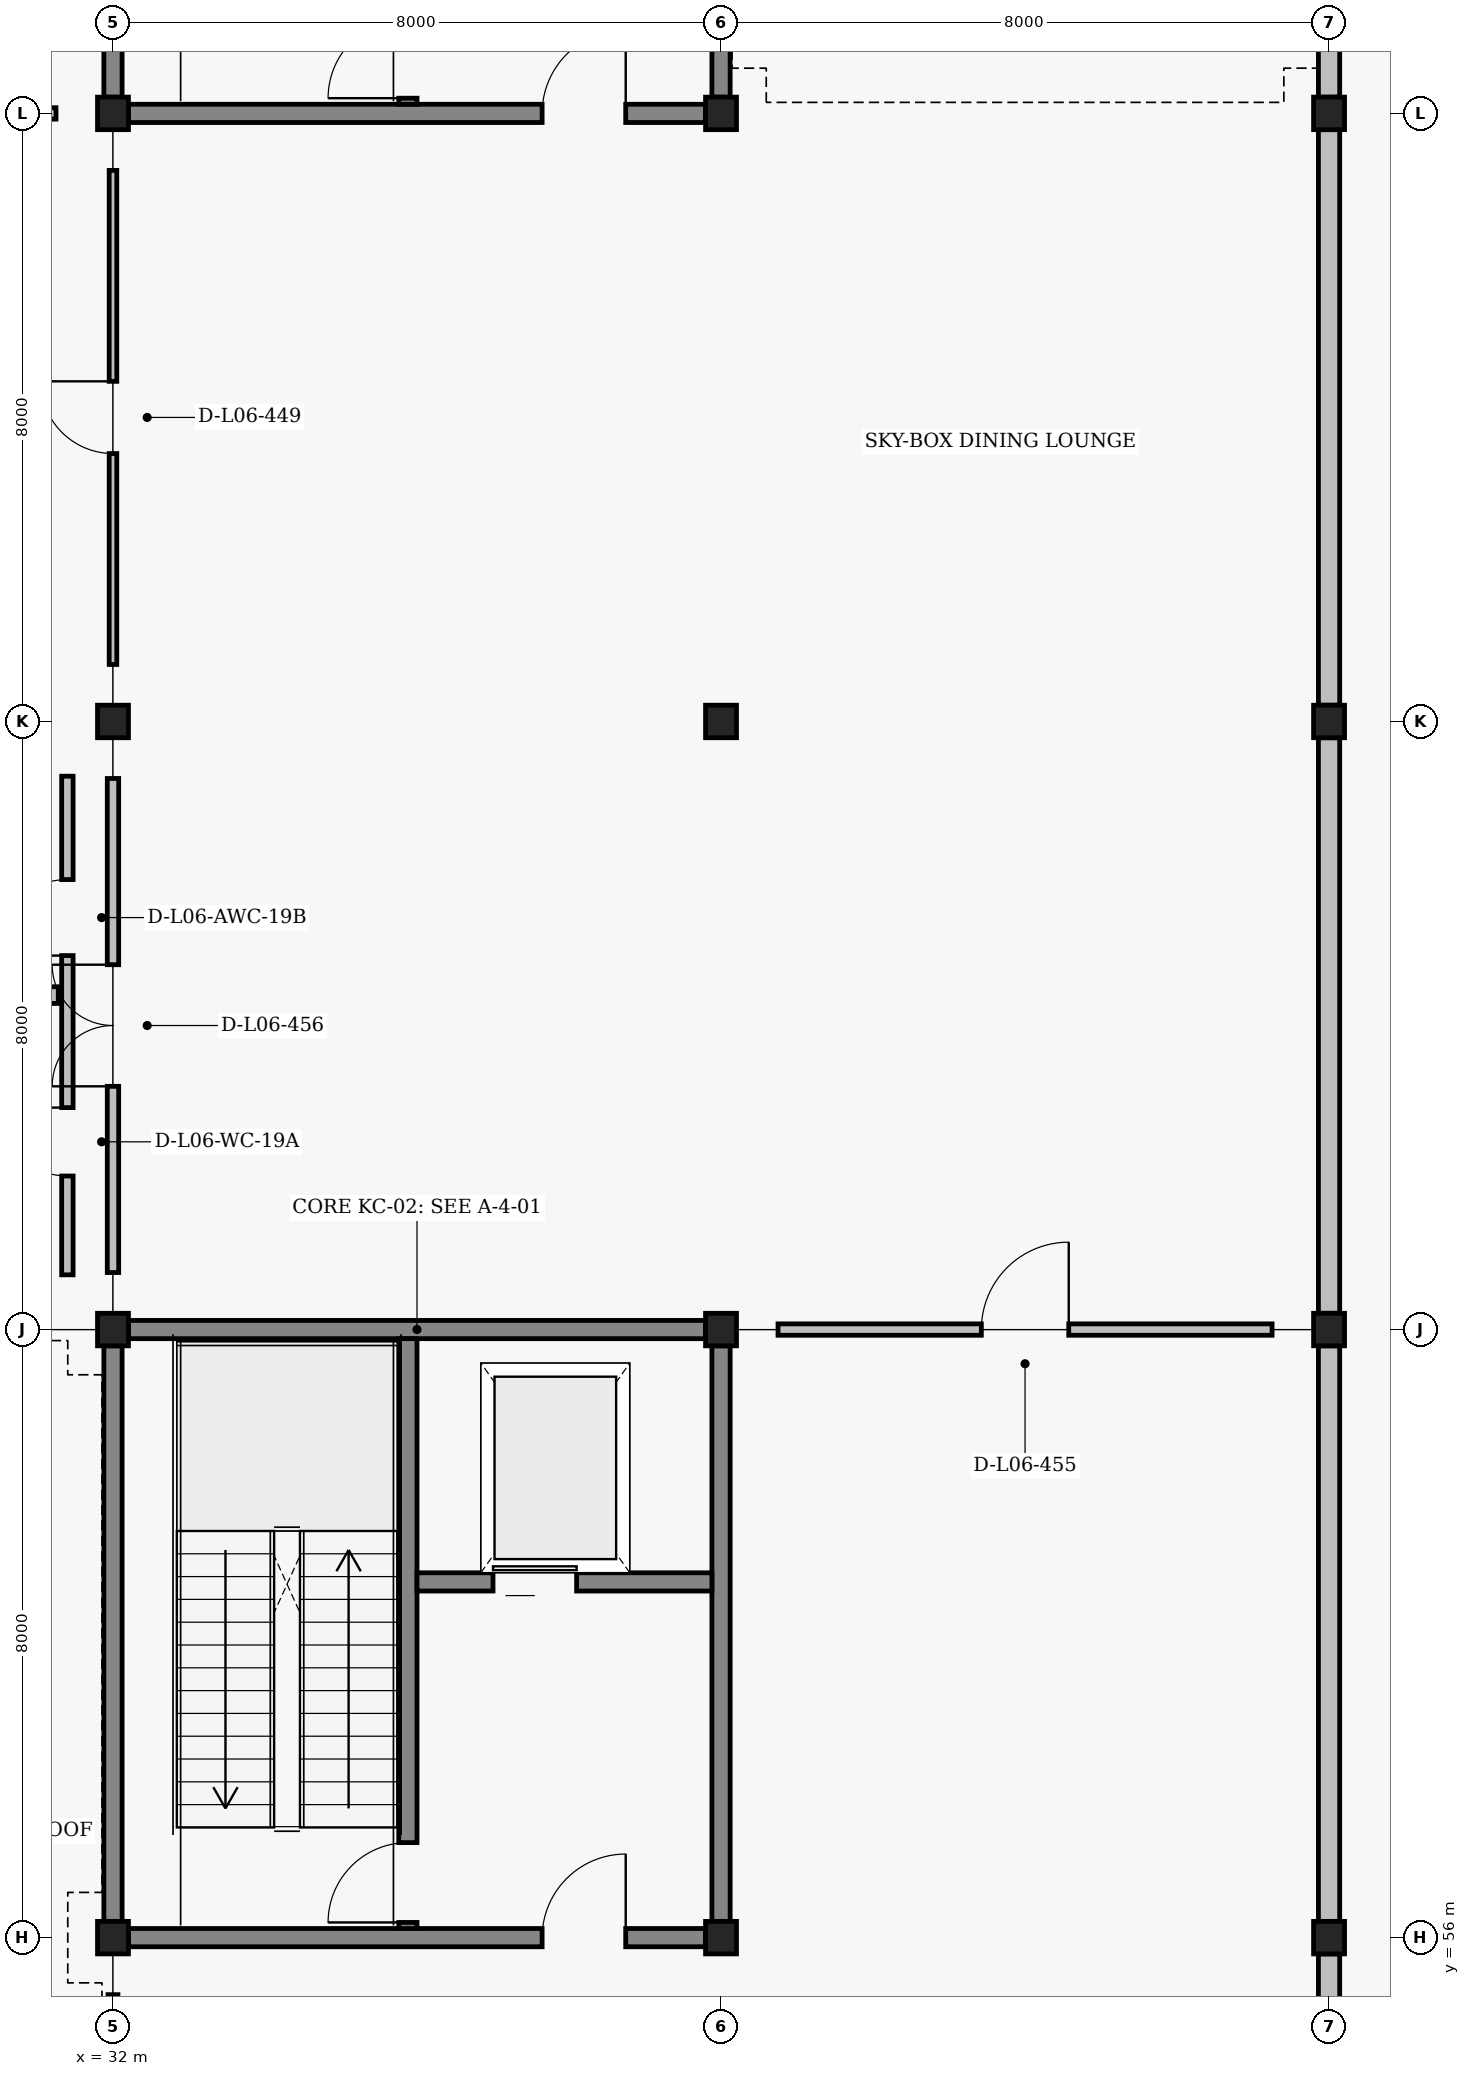
"""IFC4 building model, lengths in metres.
Left out: names, types, materials, properties, quantities, classifications, styles, units other than length and angle.
Written with IfcOpenShell. Run it as: python <this file> out.ifc"""

import sys

from ifc_helpers import new_model, si_unit, direction, frame, frame_2d, origin, origin_2d, place, context, subcontext, project, spatial, rectangle, i_section, extrude, element, fill, save


model = new_model("IFC4")
c1 = context("Model", 3, precision=1e-05, world=origin(), true_north=direction((0.0, 1.0)))
c2 = subcontext(c1, "Body", "Model", "MODEL_VIEW")
j1 = project(units=[si_unit("LENGTHUNIT", "METRE"), si_unit("PLANEANGLEUNIT", "RADIAN")], contexts=[c1])
p1 = place(None, origin())
s1 = spatial("IfcSite", under=j1, at=p1, CompositionType="ELEMENT")
p2 = place(p1, origin())
s2 = spatial("IfcBuilding", under=s1, at=p2, CompositionType="ELEMENT")
p3 = place(p2, frame((0.0, 0.0, 22.8)))
s3 = spatial("IfcBuildingStorey", under=s2, at=p3, CompositionType="ELEMENT", Elevation=22.8)
for number, where, z_axis, x_axis in (
    (1, (32.0, 56.0, 0.0), (0.0, 0.0, 1.0), (1.0, 0.0, 0.0)),
    (2, (32.0, 64.0, 0.0), (0.0, 0.0, 1.0), (1.0, 0.0, 0.0)),
    (3, (32.0, 72.0, 0.0), (0.0, 0.0, 1.0), (1.0, 0.0, 0.0)),
    (4, (32.0, 80.0, 0.0), (0.0, 0.0, 1.0), (1.0, 0.0, 0.0)),
    (5, (40.0, 56.0, 0.0), (0.0, 0.0, 1.0), (1.0, 0.0, 0.0)),
    (6, (40.0, 64.0, 0.0), (0.0, 0.0, 1.0), (1.0, 0.0, 0.0)),
    (7, (40.0, 72.0, 0.0), (0.0, 0.0, 1.0), (1.0, 0.0, 0.0)),
    (8, (40.0, 80.0, 0.0), (0.0, 0.0, 1.0), (1.0, 0.0, 0.0)),
    (9, (48.0, 56.0, 0.0), (0.0, 0.0, 1.0), (1.0, 0.0, 0.0)),
    (10, (48.0, 64.0, 0.0), (0.0, 0.0, 1.0), (1.0, 0.0, 0.0)),
    (11, (48.0, 72.0, 0.0), (0.0, 0.0, 1.0), (1.0, 0.0, 0.0)),
    (12, (48.0, 80.0, 0.0), (0.0, 0.0, 1.0), (1.0, 0.0, 0.0)),
):
    element("IfcColumn", number, at=place(p3, frame(where, z_axis=z_axis, x_axis=x_axis)), inside=s3, PredefinedType="COLUMN", context=c2, shape_type="SweptSolid", body=[
        extrude(i_section(OverallWidth=0.407, OverallDepth=0.428, WebThickness=0.02, FlangeThickness=0.035, at=origin_2d()), origin(), (0.0, 0.0, 1.0), 4.2),
    ])
for number, where, z_axis, x_axis in (
    (13, (48.0, 48.214, 0.0), (0.0, 0.0, 1.0), (0.0, 1.0, 0.0)),
    (14, (48.0, 56.214, 0.0), (0.0, 0.0, 1.0), (0.0, 1.0, 0.0)),
    (15, (48.0, 64.214, 0.0), (0.0, 0.0, 1.0), (0.0, 1.0, 0.0)),
    (16, (48.0, 72.214, 0.0), (0.0, 0.0, 1.0), (0.0, 1.0, 0.0)),
    (17, (48.0, 80.214, 0.0), (0.0, 0.0, 1.0), (0.0, 1.0, 0.0)),
):
    element("IfcWall", number, at=place(p3, frame(where, z_axis=z_axis, x_axis=x_axis)), inside=s3, PredefinedType="SOLIDWALL", context=c2, shape_type="SweptSolid", body=[
        extrude(rectangle(XDim=7.572, YDim=0.28, at=frame_2d((3.786, 0.0))), origin(), (0.0, 0.0, 1.0), 3.34),
    ])
p4 = place(p3, frame((32.204, 56.0, 0.0), z_axis=(0.0, 0.0, 1.0), x_axis=(1.0, 0.0, 0.0)))
e18 = element("IfcWall", 18, at=p4, inside=s3, PredefinedType="SHEAR", context=c2, shape_type="SweptSolid", body=[
    extrude(rectangle(XDim=7.592, YDim=0.24, at=frame_2d((3.796, 0.0))), origin(), (0.0, 0.0, 1.0), 3.34),
])
p5 = place(p4, frame((5.442, 0.0, 0.0)))
e19 = element("IfcOpeningElement", 19, at=p5, cuts=e18, PredefinedType="OPENING", context=c2, shape_type="SweptSolid", body=[
    extrude(rectangle(XDim=1.1, YDim=2.2, at=frame_2d((0.55, 1.1))), frame((0.0, 0.13, 0.0), z_axis=(0.0, -1.0, 0.0), x_axis=(1.0, 0.0, 0.0)), (0.0, 0.0, 1.0), 0.26),
])
p6 = place(p3, frame((32.204, 64.0, 0.0), z_axis=(0.0, 0.0, 1.0), x_axis=(1.0, 0.0, 0.0)))
e20 = element("IfcWall", 20, at=p6, inside=s3, PredefinedType="SHEAR", context=c2, shape_type="SweptSolid", body=[
    extrude(rectangle(XDim=7.592, YDim=0.24, at=frame_2d((3.796, 0.0))), origin(), (0.0, 0.0, 1.0), 3.34),
])
for number, where, z_axis, x_axis in (
    (21, (32.0, 56.214, 0.0), (0.0, 0.0, 1.0), (0.0, 1.0, 0.0)),
    (22, (40.0, 56.214, 0.0), (0.0, 0.0, 1.0), (0.0, 1.0, 0.0)),
):
    element("IfcWall", number, at=place(p3, frame(where, z_axis=z_axis, x_axis=x_axis)), inside=s3, PredefinedType="SHEAR", context=c2, shape_type="SweptSolid", body=[
        extrude(rectangle(XDim=7.572, YDim=0.24, at=frame_2d((3.786, 0.0))), origin(), (0.0, 0.0, 1.0), 3.34),
    ])
p7 = place(p3, frame((35.88, 56.12, 0.0), z_axis=(0.0, 0.0, 1.0), x_axis=(0.0, 1.0, 0.0)))
e23 = element("IfcWall", 23, at=p7, inside=s3, PredefinedType="SHEAR", context=c2, shape_type="SweptSolid", body=[
    extrude(rectangle(XDim=7.76, YDim=0.24, at=frame_2d((3.88, 0.0))), origin(), (0.0, 0.0, 1.0), 3.44),
])
p8 = place(p7, frame((0.08, 0.0, 0.0)))
e24 = element("IfcOpeningElement", 24, at=p8, cuts=e23, PredefinedType="OPENING", context=c2, shape_type="SweptSolid", body=[
    extrude(rectangle(XDim=1.05, YDim=2.15, at=frame_2d((0.525, 1.075))), frame((0.0, 0.13, 0.0), z_axis=(0.0, -1.0, 0.0), x_axis=(1.0, 0.0, 0.0)), (0.0, 0.0, 1.0), 0.26),
])
p9 = place(p3, frame((36.0, 60.68, 0.0), z_axis=(0.0, 0.0, 1.0), x_axis=(1.0, 0.0, 0.0)))
e25 = element("IfcWall", 25, at=p9, inside=s3, PredefinedType="SHEAR", context=c2, shape_type="SweptSolid", body=[
    extrude(rectangle(XDim=3.88, YDim=0.24, at=frame_2d((1.94, 0.0))), origin(), (0.0, 0.0, 1.0), 3.34),
])
p10 = place(p9, frame((1.0, 0.0, 0.0)))
e26 = element("IfcOpeningElement", 26, at=p10, cuts=e25, PredefinedType="OPENING", context=c2, shape_type="SweptSolid", body=[
    extrude(rectangle(XDim=1.1, YDim=2.15, at=frame_2d((0.55, 1.075))), frame((0.0, 0.13, 0.0), z_axis=(0.0, -1.0, 0.0), x_axis=(1.0, 0.0, 0.0)), (0.0, 0.0, 1.0), 0.26),
])
p11 = place(p3, frame((32.204, 80.0, 0.0), z_axis=(0.0, 0.0, 1.0), x_axis=(1.0, 0.0, 0.0)))
e27 = element("IfcWall", 27, at=p11, inside=s3, PredefinedType="SHEAR", context=c2, shape_type="SweptSolid", body=[
    extrude(rectangle(XDim=7.592, YDim=0.24, at=frame_2d((3.796, 0.0))), origin(), (0.0, 0.0, 1.0), 3.34),
])
p12 = place(p11, frame((5.442, 0.0, 0.0)))
e28 = element("IfcOpeningElement", 28, at=p12, cuts=e27, PredefinedType="OPENING", context=c2, shape_type="SweptSolid", body=[
    extrude(rectangle(XDim=1.1, YDim=2.2, at=frame_2d((0.55, 1.1))), frame((0.0, 0.13, 0.0), z_axis=(0.0, -1.0, 0.0), x_axis=(1.0, 0.0, 0.0)), (0.0, 0.0, 1.0), 0.26),
])
for number, where, z_axis, x_axis in (
    (29, (32.0, 80.214, 0.0), (0.0, 0.0, 1.0), (0.0, 1.0, 0.0)),
    (30, (40.0, 80.214, 0.0), (0.0, 0.0, 1.0), (0.0, 1.0, 0.0)),
):
    element("IfcWall", number, at=place(p3, frame(where, z_axis=z_axis, x_axis=x_axis)), inside=s3, PredefinedType="SHEAR", context=c2, shape_type="SweptSolid", body=[
        extrude(rectangle(XDim=7.572, YDim=0.24, at=frame_2d((3.786, 0.0))), origin(), (0.0, 0.0, 1.0), 3.34),
    ])
p13 = place(p3, frame((35.88, 80.12, 0.0), z_axis=(0.0, 0.0, 1.0), x_axis=(0.0, 1.0, 0.0)))
e31 = element("IfcWall", 31, at=p13, inside=s3, PredefinedType="SHEAR", context=c2, shape_type="SweptSolid", body=[
    extrude(rectangle(XDim=7.76, YDim=0.24, at=frame_2d((3.88, 0.0))), origin(), (0.0, 0.0, 1.0), 3.44),
])
p14 = place(p13, frame((0.08, 0.0, 0.0)))
e32 = element("IfcOpeningElement", 32, at=p14, cuts=e31, PredefinedType="OPENING", context=c2, shape_type="SweptSolid", body=[
    extrude(rectangle(XDim=1.05, YDim=2.15, at=frame_2d((0.525, 1.075))), frame((0.0, 0.13, 0.0), z_axis=(0.0, -1.0, 0.0), x_axis=(1.0, 0.0, 0.0)), (0.0, 0.0, 1.0), 0.26),
])
p15 = place(p3, frame((24.72, 68.4, 0.0), z_axis=(0.0, 0.0, 1.0), x_axis=(1.0, 0.0, 0.0)))
e33 = element("IfcWall", 33, at=p15, inside=s3, PredefinedType="PLUMBINGWALL", context=c2, shape_type="SweptSolid", body=[
    extrude(rectangle(XDim=6.56, YDim=0.22, at=frame_2d((3.28, 0.0))), origin(), (0.0, 0.0, 1.0), 3.64),
])
p16 = place(p3, frame((31.4, 64.72, 0.0), z_axis=(0.0, 0.0, 1.0), x_axis=(0.0, 1.0, 0.0)))
e34 = element("IfcWall", 34, at=p16, inside=s3, PredefinedType="PARTITIONING", context=c2, shape_type="SweptSolid", body=[
    extrude(rectangle(XDim=6.56, YDim=0.15, at=frame_2d((3.28, 0.0))), origin(), (0.0, 0.0, 1.0), 3.64),
])
p17 = place(p16, frame((1.3, 0.0, 0.0)))
e35 = element("IfcOpeningElement", 35, at=p17, cuts=e34, PredefinedType="OPENING", context=c2, shape_type="SweptSolid", body=[
    extrude(rectangle(XDim=0.9, YDim=2.1, at=frame_2d((0.45, 1.05))), frame((0.0, 0.085, 0.0), z_axis=(0.0, -1.0, 0.0), x_axis=(1.0, 0.0, 0.0)), (0.0, 0.0, 1.0), 0.17),
])
p18 = place(p16, frame((4.2, 0.0, 0.0)))
e36 = element("IfcOpeningElement", 36, at=p18, cuts=e34, PredefinedType="OPENING", context=c2, shape_type="SweptSolid", body=[
    extrude(rectangle(XDim=1.0, YDim=2.15, at=frame_2d((0.5, 1.075))), frame((0.0, 0.085, 0.0), z_axis=(0.0, -1.0, 0.0), x_axis=(1.0, 0.0, 0.0)), (0.0, 0.0, 1.0), 0.17),
])
p19 = place(p3, frame((32.0, 48.75, 0.0), z_axis=(0.0, 0.0, 1.0), x_axis=(0.0, 1.0, 0.0)))
e37 = element("IfcWall", 37, at=p19, inside=s3, PredefinedType="PARTITIONING", context=c2, shape_type="SweptSolid", body=[
    extrude(rectangle(XDim=6.5, YDim=0.13, at=frame_2d((3.25, 0.0))), origin(), (0.0, 0.0, 1.0), 3.34),
])
p20 = place(p19, frame((2.75, 0.0, 0.0)))
e38 = element("IfcOpeningElement", 38, at=p20, cuts=e37, PredefinedType="OPENING", context=c2, shape_type="SweptSolid", body=[
    extrude(rectangle(XDim=1.0, YDim=2.1, at=frame_2d((0.5, 1.05))), frame((0.0, 0.075, 0.0), z_axis=(0.0, -1.0, 0.0), x_axis=(1.0, 0.0, 0.0)), (0.0, 0.0, 1.0), 0.15),
])
p21 = place(p3, frame((32.0, 72.75, 0.0), z_axis=(0.0, 0.0, 1.0), x_axis=(0.0, 1.0, 0.0)))
e39 = element("IfcWall", 39, at=p21, inside=s3, PredefinedType="PARTITIONING", context=c2, shape_type="SweptSolid", body=[
    extrude(rectangle(XDim=6.5, YDim=0.1, at=frame_2d((3.25, 0.0))), origin(), (0.0, 0.0, 1.0), 3.34),
])
p22 = place(p21, frame((2.775, 0.0, 0.0)))
e40 = element("IfcOpeningElement", 40, at=p22, cuts=e39, PredefinedType="OPENING", context=c2, shape_type="SweptSolid", body=[
    extrude(rectangle(XDim=0.95, YDim=2.1, at=frame_2d((0.475, 1.05))), frame((0.0, 0.06, 0.0), z_axis=(0.0, -1.0, 0.0), x_axis=(1.0, 0.0, 0.0)), (0.0, 0.0, 1.0), 0.12),
])
p23 = place(p3, frame((24.75, 80.0, 0.0), z_axis=(0.0, 0.0, 1.0), x_axis=(1.0, 0.0, 0.0)))
e41 = element("IfcWall", 41, at=p23, inside=s3, PredefinedType="PARTITIONING", context=c2, shape_type="SweptSolid", body=[
    extrude(rectangle(XDim=6.5, YDim=0.15, at=frame_2d((3.25, 0.0))), origin(), (0.0, 0.0, 1.0), 3.44),
])
p24 = place(p23, frame((2.675, 0.0, 0.0)))
e42 = element("IfcOpeningElement", 42, at=p24, cuts=e41, PredefinedType="OPENING", context=c2, shape_type="SweptSolid", body=[
    extrude(rectangle(XDim=1.15, YDim=2.15, at=frame_2d((0.575, 1.075))), frame((0.0, 0.085, 0.0), z_axis=(0.0, -1.0, 0.0), x_axis=(1.0, 0.0, 0.0)), (0.0, 0.0, 1.0), 0.17),
])
p25 = place(p3, frame((40.75, 64.0, 0.0), z_axis=(0.0, 0.0, 1.0), x_axis=(1.0, 0.0, 0.0)))
e43 = element("IfcWall", 43, at=p25, inside=s3, PredefinedType="PARTITIONING", context=c2, shape_type="SweptSolid", body=[
    extrude(rectangle(XDim=6.5, YDim=0.15, at=frame_2d((3.25, 0.0))), origin(), (0.0, 0.0, 1.0), 3.44),
])
p26 = place(p25, frame((2.675, 0.0, 0.0)))
e44 = element("IfcOpeningElement", 44, at=p26, cuts=e43, PredefinedType="OPENING", context=c2, shape_type="SweptSolid", body=[
    extrude(rectangle(XDim=1.15, YDim=2.15, at=frame_2d((0.575, 1.075))), frame((0.0, 0.085, 0.0), z_axis=(0.0, -1.0, 0.0), x_axis=(1.0, 0.0, 0.0)), (0.0, 0.0, 1.0), 0.17),
])
p27 = place(p3, frame((32.0, 64.75, 0.0), z_axis=(0.0, 0.0, 1.0), x_axis=(0.0, 1.0, 0.0)))
e45 = element("IfcWall", 45, at=p27, inside=s3, PredefinedType="PARTITIONING", context=c2, shape_type="SweptSolid", body=[
    extrude(rectangle(XDim=6.5, YDim=0.15, at=frame_2d((3.25, 0.0))), origin(), (0.0, 0.0, 1.0), 3.34),
])
p28 = place(p27, frame((2.45, 0.0, 0.0)))
e46 = element("IfcOpeningElement", 46, at=p28, cuts=e45, PredefinedType="OPENING", context=c2, shape_type="SweptSolid", body=[
    extrude(rectangle(XDim=1.6, YDim=2.2, at=frame_2d((0.8, 1.1))), frame((0.0, 0.085, 0.0), z_axis=(0.0, -1.0, 0.0), x_axis=(1.0, 0.0, 0.0)), (0.0, 0.0, 1.0), 0.17),
])
p29 = place(p5, origin())
e47 = element("IfcDoor", 47, at=p29, inside=s3, OperationType="SINGLE_SWING_RIGHT", PredefinedType="DOOR", context=c2, shape_type="SweptSolid", body=[
    extrude(rectangle(XDim=1.1, YDim=2.2, at=frame_2d((0.55, 1.1))), frame((0.0, 0.025, 0.0), z_axis=(0.0, -1.0, 0.0), x_axis=(1.0, 0.0, 0.0)), (0.0, 0.0, 1.0), 0.05),
])
fill(e19, e47)
p30 = place(p8, origin())
e48 = element("IfcDoor", 48, at=p30, inside=s3, OperationType="SINGLE_SWING_LEFT", PredefinedType="DOOR", context=c2, shape_type="SweptSolid", body=[
    extrude(rectangle(XDim=1.05, YDim=2.15, at=frame_2d((0.525, 1.075))), frame((0.0, 0.025, 0.0), z_axis=(0.0, -1.0, 0.0), x_axis=(1.0, 0.0, 0.0)), (0.0, 0.0, 1.0), 0.05),
])
fill(e24, e48)
p31 = place(p10, origin())
e49 = element("IfcDoor", 49, at=p31, inside=s3, OperationType="SLIDING_TO_LEFT", PredefinedType="DOOR", context=c2, shape_type="SweptSolid", body=[
    extrude(rectangle(XDim=1.1, YDim=2.15, at=frame_2d((0.55, 1.075))), frame((0.0, 0.025, 0.0), z_axis=(0.0, -1.0, 0.0), x_axis=(1.0, 0.0, 0.0)), (0.0, 0.0, 1.0), 0.05),
])
fill(e26, e49)
p32 = place(p12, origin())
e50 = element("IfcDoor", 50, at=p32, inside=s3, OperationType="SINGLE_SWING_RIGHT", PredefinedType="DOOR", context=c2, shape_type="SweptSolid", body=[
    extrude(rectangle(XDim=1.1, YDim=2.2, at=frame_2d((0.55, 1.1))), frame((0.0, 0.025, 0.0), z_axis=(0.0, -1.0, 0.0), x_axis=(1.0, 0.0, 0.0)), (0.0, 0.0, 1.0), 0.05),
])
fill(e28, e50)
p33 = place(p14, origin())
e51 = element("IfcDoor", 51, at=p33, inside=s3, OperationType="SINGLE_SWING_LEFT", PredefinedType="DOOR", context=c2, shape_type="SweptSolid", body=[
    extrude(rectangle(XDim=1.05, YDim=2.15, at=frame_2d((0.525, 1.075))), frame((0.0, 0.025, 0.0), z_axis=(0.0, -1.0, 0.0), x_axis=(1.0, 0.0, 0.0)), (0.0, 0.0, 1.0), 0.05),
])
fill(e32, e51)
p34 = place(p17, origin())
e52 = element("IfcDoor", 52, at=p34, inside=s3, OperationType="SINGLE_SWING_RIGHT", PredefinedType="DOOR", context=c2, shape_type="SweptSolid", body=[
    extrude(rectangle(XDim=0.9, YDim=2.1, at=frame_2d((0.45, 1.05))), frame((0.0, 0.025, 0.0), z_axis=(0.0, -1.0, 0.0), x_axis=(1.0, 0.0, 0.0)), (0.0, 0.0, 1.0), 0.05),
])
fill(e35, e52)
p35 = place(p18, origin())
e53 = element("IfcDoor", 53, at=p35, inside=s3, OperationType="SINGLE_SWING_LEFT", PredefinedType="DOOR", context=c2, shape_type="SweptSolid", body=[
    extrude(rectangle(XDim=1.0, YDim=2.15, at=frame_2d((0.5, 1.075))), frame((0.0, 0.025, 0.0), z_axis=(0.0, -1.0, 0.0), x_axis=(1.0, 0.0, 0.0)), (0.0, 0.0, 1.0), 0.05),
])
fill(e36, e53)
p36 = place(p22, origin())
e54 = element("IfcDoor", 54, at=p36, inside=s3, OperationType="SINGLE_SWING_RIGHT", PredefinedType="DOOR", context=c2, shape_type="SweptSolid", body=[
    extrude(rectangle(XDim=0.95, YDim=2.1, at=frame_2d((0.475, 1.05))), frame((0.0, 0.025, 0.0), z_axis=(0.0, -1.0, 0.0), x_axis=(1.0, 0.0, 0.0)), (0.0, 0.0, 1.0), 0.05),
])
fill(e40, e54)
p37 = place(p26, origin())
e55 = element("IfcDoor", 55, at=p37, inside=s3, OperationType="SINGLE_SWING_RIGHT", PredefinedType="DOOR", context=c2, shape_type="SweptSolid", body=[
    extrude(rectangle(XDim=1.15, YDim=2.15, at=frame_2d((0.575, 1.075))), frame((0.0, 0.025, 0.0), z_axis=(0.0, -1.0, 0.0), x_axis=(1.0, 0.0, 0.0)), (0.0, 0.0, 1.0), 0.05),
])
fill(e44, e55)
p38 = place(p28, origin())
e56 = element("IfcDoor", 56, at=p38, inside=s3, OperationType="DOUBLE_SWING_LEFT", PredefinedType="DOOR", context=c2, shape_type="SweptSolid", body=[
    extrude(rectangle(XDim=1.6, YDim=2.2, at=frame_2d((0.8, 1.1))), frame((0.0, 0.025, 0.0), z_axis=(0.0, -1.0, 0.0), x_axis=(1.0, 0.0, 0.0)), (0.0, 0.0, 1.0), 0.05),
])
fill(e46, e56)
save(model, sys.argv[1])
